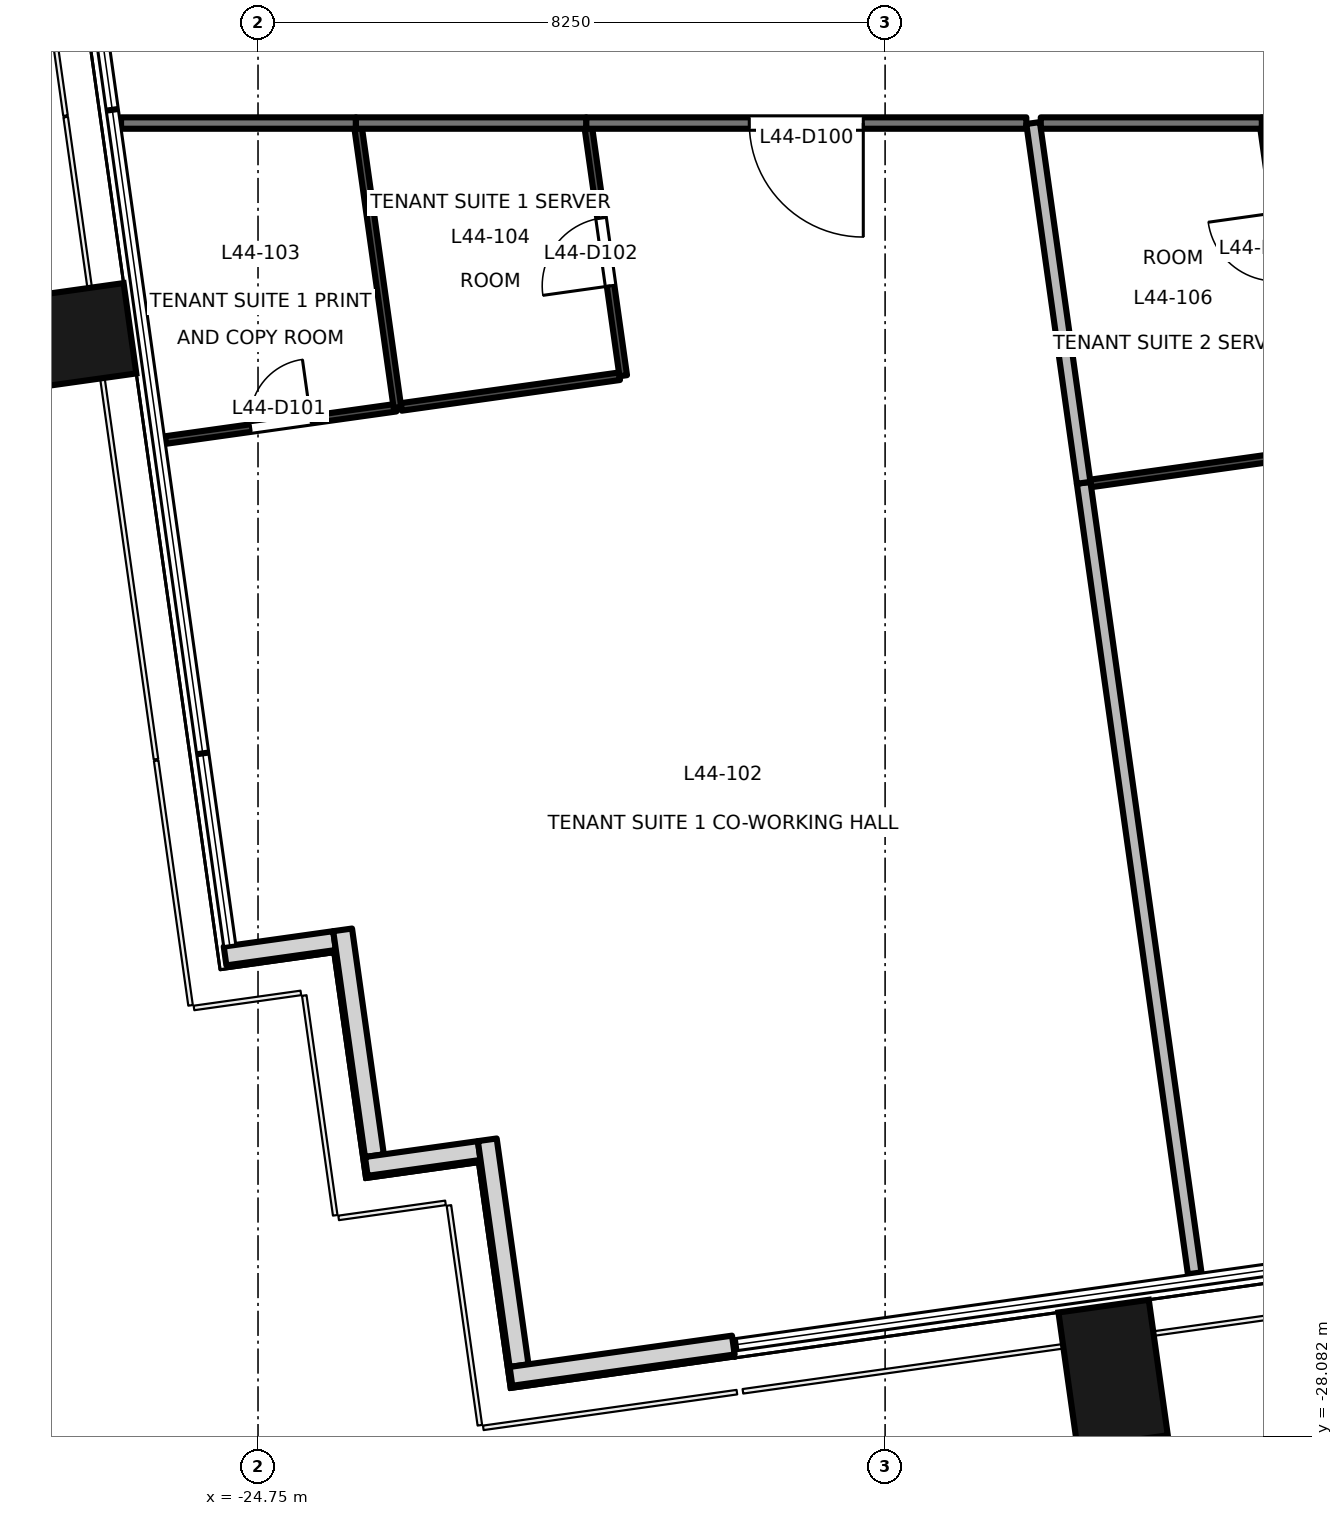
"""IFC4 building model, lengths in metres.
Left out: names, types, materials, properties, quantities, classifications, styles, units other than length and angle.
Written with IfcOpenShell. Run it as: python <this file> out.ifc"""

import sys

from ifc_helpers import new_model, si_unit, direction, frame, frame_2d, origin, origin_2d, place, context, subcontext, project, spatial, rectangle, extrude, element, fill, save


model = new_model("IFC4")
c1 = context("Model", 3, precision=1e-05, world=origin(), true_north=direction((0.0, 1.0)))
c2 = subcontext(c1, "Body", "Model", "MODEL_VIEW")
j1 = project(units=[si_unit("LENGTHUNIT", "METRE"), si_unit("PLANEANGLEUNIT", "RADIAN")], contexts=[c1])
p1 = place(None, origin())
s1 = spatial("IfcSite", under=j1, at=p1, CompositionType="ELEMENT")
p2 = place(p1, origin())
s2 = spatial("IfcBuilding", under=s1, at=p2, CompositionType="ELEMENT")
p3 = place(p2, frame((0.0, 0.0, 191.9)))
s3 = spatial("IfcBuildingStorey", under=s2, at=p3, CompositionType="ELEMENT", Elevation=191.9)
for number, where, z_axis, x_axis in (
    (1, (-13.5, -27.256, -0.2), (0.0, 0.0, 1.0), (0.99, 0.139, 0.0)),
    (2, (-27.326, -13.625, -0.2), (0.0, 0.0, 1.0), (-0.139, 0.99, 0.0)),
):
    element("IfcColumn", number, at=place(p3, frame(where, z_axis=z_axis, x_axis=x_axis)), inside=s3, PredefinedType="COLUMN", context=c2, shape_type="SweptSolid", body=[
        extrude(rectangle(XDim=1.2, YDim=1.8, at=origin_2d()), origin(), (0.0, 0.0, 1.0), 3.9),
    ])
p4 = place(p3, frame((-25.184, -21.758, 0.0), z_axis=(0.0, 0.0, 1.0), x_axis=(0.9902493448, 0.13930626376, 0.0)))
e3 = element("IfcWall", 3, at=p4, inside=s3, PredefinedType="SOLIDWALL", context=c2, shape_type="SweptSolid", body=[
    extrude(rectangle(XDim=1.455, YDim=0.25, at=frame_2d((0.727, 0.0))), origin(), (0.0, 0.0, 1.0), 3.7),
])
p5 = place(p3, frame((-23.637, -21.414, 0.0), z_axis=(0.0, 0.0, 1.0), x_axis=(0.139313431826, -0.990248336385, 0.0)))
e4 = element("IfcWall", 4, at=p5, inside=s3, PredefinedType="SOLIDWALL", context=c2, shape_type="SweptSolid", body=[
    extrude(rectangle(XDim=3.0, YDim=0.25, at=frame_2d((1.5, 0.0))), origin(), (0.0, 0.0, 1.0), 3.7),
])
p6 = place(p3, frame((-23.325, -24.526, 0.0), z_axis=(0.0, 0.0, 1.0), x_axis=(0.990243596651, 0.13934711799, 0.0)))
e5 = element("IfcWall", 5, at=p6, inside=s3, PredefinedType="SOLIDWALL", context=c2, shape_type="SweptSolid", body=[
    extrude(rectangle(XDim=1.5, YDim=0.25, at=frame_2d((0.75, 0.0))), origin(), (0.0, 0.0, 1.0), 3.7),
])
p7 = place(p3, frame((-21.734, -24.176, 0.0), z_axis=(0.0, 0.0, 1.0), x_axis=(0.139313431826, -0.990248336385, 0.0)))
e6 = element("IfcWall", 6, at=p7, inside=s3, PredefinedType="SOLIDWALL", context=c2, shape_type="SweptSolid", body=[
    extrude(rectangle(XDim=3.0, YDim=0.25, at=frame_2d((1.5, 0.0))), origin(), (0.0, 0.0, 1.0), 3.7),
])
p8 = place(p3, frame((-21.422, -27.288, 0.0), z_axis=(0.0, 0.0, 1.0), x_axis=(0.990246427036, 0.139327002919, 0.0)))
e7 = element("IfcWall", 7, at=p8, inside=s3, PredefinedType="SOLIDWALL", context=c2, shape_type="SweptSolid", body=[
    extrude(rectangle(XDim=2.954, YDim=0.25, at=frame_2d((1.477, 0.0))), origin(), (0.0, 0.0, 1.0), 3.7),
])
p9 = place(p3, frame((-14.642, -10.8, 0.0), z_axis=(0.0, 0.0, 1.0), x_axis=(-1.0, 0.0, 0.0)))
e8 = element("IfcWall", 8, at=p9, inside=s3, PredefinedType="PARTITIONING", context=c2, shape_type="SweptSolid", body=[
    extrude(rectangle(XDim=5.791, YDim=0.15, at=frame_2d((2.896, 0.0))), origin(), (0.0, 0.0, 1.0), 3.7),
])
p10 = place(p9, frame((2.145, 0.0, 0.0)))
e9 = element("IfcOpeningElement", 9, at=p10, cuts=e8, PredefinedType="OPENING", context=c2, shape_type="SweptSolid", body=[
    extrude(rectangle(XDim=1.5, YDim=2.1, at=frame_2d((0.75, 1.05))), frame((0.0, 0.085, 0.0), z_axis=(0.0, -1.0, 0.0), x_axis=(1.0, 0.0, 0.0)), (0.0, 0.0, 1.0), 0.171),
])
p11 = place(p3, frame((-23.462, -10.8, 0.0), z_axis=(0.0, 0.0, 1.0), x_axis=(-1.0, 0.0, 0.0)))
e10 = element("IfcWall", 10, at=p11, inside=s3, PredefinedType="PARTITIONING", context=c2, shape_type="SweptSolid", body=[
    extrude(rectangle(XDim=3.09, YDim=0.15, at=frame_2d((1.545, 0.0))), origin(), (0.0, 0.0, 1.0), 3.7),
])
p12 = place(p3, frame((-20.433, -10.8, 0.0), z_axis=(0.0, 0.0, 1.0), x_axis=(-1.0, 0.0, 0.0)))
e11 = element("IfcWall", 11, at=p12, inside=s3, PredefinedType="PARTITIONING", context=c2, shape_type="SweptSolid", body=[
    extrude(rectangle(XDim=3.029, YDim=0.15, at=frame_2d((1.514, 0.0))), origin(), (0.0, 0.0, 1.0), 3.7),
])
p13 = place(p3, frame((-5.337, -10.8, 0.0), z_axis=(0.0, 0.0, 1.0), x_axis=(-1.0, 0.0, 0.0)))
e12 = element("IfcWall", 12, at=p13, inside=s3, PredefinedType="PARTITIONING", context=c2, shape_type="SweptSolid", body=[
    extrude(rectangle(XDim=6.207, YDim=0.15, at=frame_2d((3.104, 0.0))), origin(), (0.0, 0.0, 1.0), 2.8),
])
p14 = place(p13, frame((3.405, 0.0, 0.0)))
e13 = element("IfcOpeningElement", 13, at=p14, cuts=e12, PredefinedType="OPENING", context=c2, shape_type="SweptSolid", body=[
    extrude(rectangle(XDim=1.5, YDim=2.1, at=frame_2d((0.75, 1.05))), frame((0.0, 0.085, 0.0), z_axis=(0.0, -1.0, 0.0), x_axis=(1.0, 0.0, 0.0)), (0.0, 0.0, 1.0), 0.171),
])
p15 = place(p3, frame((-11.544, -10.8, 0.0), z_axis=(0.0, 0.0, 1.0), x_axis=(-1.0, 0.0, 0.0)))
e14 = element("IfcWall", 14, at=p15, inside=s3, PredefinedType="PARTITIONING", context=c2, shape_type="SweptSolid", body=[
    extrude(rectangle(XDim=2.908, YDim=0.15, at=frame_2d((1.454, 0.0))), origin(), (0.0, 0.0, 1.0), 2.8),
])
p16 = place(p3, frame((-25.966, -14.97, 0.0), z_axis=(0.0, 0.0, 1.0), x_axis=(0.990303801212, 0.138918613964, 0.0)))
e15 = element("IfcWall", 15, at=p16, inside=s3, PredefinedType="PARTITIONING", context=c2, shape_type="SweptSolid", body=[
    extrude(rectangle(XDim=3.06, YDim=0.1, at=frame_2d((1.53, 0.0))), origin(), (0.0, 0.0, 1.0), 3.7),
])
p17 = place(p16, frame((1.13, 0.0, 0.0)))
e16 = element("IfcOpeningElement", 16, at=p17, cuts=e15, PredefinedType="OPENING", context=c2, shape_type="SweptSolid", body=[
    extrude(rectangle(XDim=0.8, YDim=2.1, at=frame_2d((0.4, 1.05))), frame((0.0, 0.061, 0.0), z_axis=(0.0, -1.0, 0.0), x_axis=(1.0, 0.0, 0.0)), (0.0, 0.0, 1.0), 0.121),
])
p18 = place(p3, frame((-22.866, -14.535, 0.0), z_axis=(0.0, 0.0, 1.0), x_axis=(0.9902520421, 0.139287088837, 0.0)))
e17 = element("IfcWall", 17, at=p18, inside=s3, PredefinedType="PARTITIONING", context=c2, shape_type="SweptSolid", body=[
    extrude(rectangle(XDim=2.899, YDim=0.1, at=frame_2d((1.45, 0.0))), origin(), (0.0, 0.0, 1.0), 3.7),
])
p19 = place(p3, frame((-19.945, -14.124, 0.0), z_axis=(0.0, 0.0, 1.0), x_axis=(-0.139290097993, 0.990251618833, 0.0)))
e18 = element("IfcWall", 18, at=p19, inside=s3, PredefinedType="PARTITIONING", context=c2, shape_type="SweptSolid", body=[
    extrude(rectangle(XDim=3.288, YDim=0.1, at=frame_2d((1.644, 0.0))), origin(), (0.0, 0.0, 1.0), 3.7),
])
p20 = place(p19, frame((1.194, 0.0, 0.0)))
e19 = element("IfcOpeningElement", 19, at=p20, cuts=e18, PredefinedType="OPENING", context=c2, shape_type="SweptSolid", body=[
    extrude(rectangle(XDim=0.9, YDim=2.1, at=frame_2d((0.45, 1.05))), frame((0.0, 0.061, 0.0), z_axis=(0.0, -1.0, 0.0), x_axis=(1.0, 0.0, 0.0)), (0.0, 0.0, 1.0), 0.121),
])
p21 = place(p3, frame((-13.888, -15.533, 0.0), z_axis=(0.0, 0.0, 1.0), x_axis=(0.139107013986, -0.990277354411, 0.0)))
e20 = element("IfcWall", 20, at=p21, inside=s3, PredefinedType="PARTITIONING", context=c2, shape_type="SweptSolid", body=[
    extrude(rectangle(XDim=10.502, YDim=0.18, at=frame_2d((5.251, 0.0))), origin(), (0.0, 0.0, 1.0), 2.8),
])
p22 = place(p3, frame((-14.553, -10.8, 0.0), z_axis=(0.0, 0.0, 1.0), x_axis=(0.139146821365, -0.990271761742, 0.0)))
e21 = element("IfcWall", 21, at=p22, inside=s3, PredefinedType="PARTITIONING", context=c2, shape_type="SweptSolid", body=[
    extrude(rectangle(XDim=4.779, YDim=0.18, at=frame_2d((2.39, 0.0))), origin(), (0.0, 0.0, 1.0), 3.7),
])
p23 = place(p3, frame((-23.432, -10.868, 0.0), z_axis=(0.0, 0.0, 1.0), x_axis=(0.139044103827, -0.990286189539, 0.0)))
e22 = element("IfcWall", 22, at=p23, inside=s3, PredefinedType="PARTITIONING", context=c2, shape_type="SweptSolid", body=[
    extrude(rectangle(XDim=3.71, YDim=0.1, at=frame_2d((1.855, 0.0))), origin(), (0.0, 0.0, 1.0), 3.7),
])
p24 = place(p3, frame((-13.796, -15.541, 0.0), z_axis=(0.0, 0.0, 1.0), x_axis=(0.990263018372, 0.139209031475, 0.0)))
e23 = element("IfcWall", 23, at=p24, inside=s3, PredefinedType="PARTITIONING", context=c2, shape_type="SweptSolid", body=[
    extrude(rectangle(XDim=2.859, YDim=0.1, at=frame_2d((1.429, 0.0))), origin(), (0.0, 0.0, 1.0), 2.8),
])
p25 = place(p3, frame((-10.915, -15.136, 0.0), z_axis=(0.0, 0.0, 1.0), x_axis=(-0.138954517122, 0.990298764097, 0.0)))
e24 = element("IfcWall", 24, at=p25, inside=s3, PredefinedType="PARTITIONING", context=c2, shape_type="SweptSolid", body=[
    extrude(rectangle(XDim=4.31, YDim=0.1, at=frame_2d((2.155, 0.0))), origin(), (0.0, 0.0, 1.0), 3.7),
])
p26 = place(p25, frame((2.287, 0.0, 0.0)))
e25 = element("IfcOpeningElement", 25, at=p26, cuts=e24, PredefinedType="OPENING", context=c2, shape_type="SweptSolid", body=[
    extrude(rectangle(XDim=0.9, YDim=2.1, at=frame_2d((0.45, 1.05))), frame((0.0, 0.061, 0.0), z_axis=(0.0, -1.0, 0.0), x_axis=(1.0, 0.0, 0.0)), (0.0, 0.0, 1.0), 0.121),
])
p27 = place(p10, origin())
e26 = element("IfcDoor", 26, at=p27, inside=s3, OperationType="DOUBLE_DOOR_SINGLE_SWING", PredefinedType="DOOR", context=c2, shape_type="SweptSolid", body=[
    extrude(rectangle(XDim=1.5, YDim=2.1, at=frame_2d((0.75, 1.05))), frame((0.0, 0.025, 0.0), z_axis=(0.0, -1.0, 0.0), x_axis=(1.0, 0.0, 0.0)), (0.0, 0.0, 1.0), 0.05),
])
fill(e9, e26)
p28 = place(p17, origin())
e27 = element("IfcDoor", 27, at=p28, inside=s3, OperationType="SINGLE_SWING_RIGHT", PredefinedType="DOOR", context=c2, shape_type="SweptSolid", body=[
    extrude(rectangle(XDim=0.8, YDim=2.1, at=frame_2d((0.4, 1.05))), frame((0.0, 0.025, 0.0), z_axis=(0.0, -1.0, 0.0), x_axis=(1.0, 0.0, 0.0)), (0.0, 0.0, 1.0), 0.05),
])
fill(e16, e27)
p29 = place(p20, origin())
e28 = element("IfcDoor", 28, at=p29, inside=s3, OperationType="SINGLE_SWING_LEFT", PredefinedType="DOOR", context=c2, shape_type="SweptSolid", body=[
    extrude(rectangle(XDim=0.9, YDim=2.1, at=frame_2d((0.45, 1.05))), frame((0.0, 0.025, 0.0), z_axis=(0.0, -1.0, 0.0), x_axis=(1.0, 0.0, 0.0)), (0.0, 0.0, 1.0), 0.05),
])
fill(e19, e28)
save(model, sys.argv[1])
